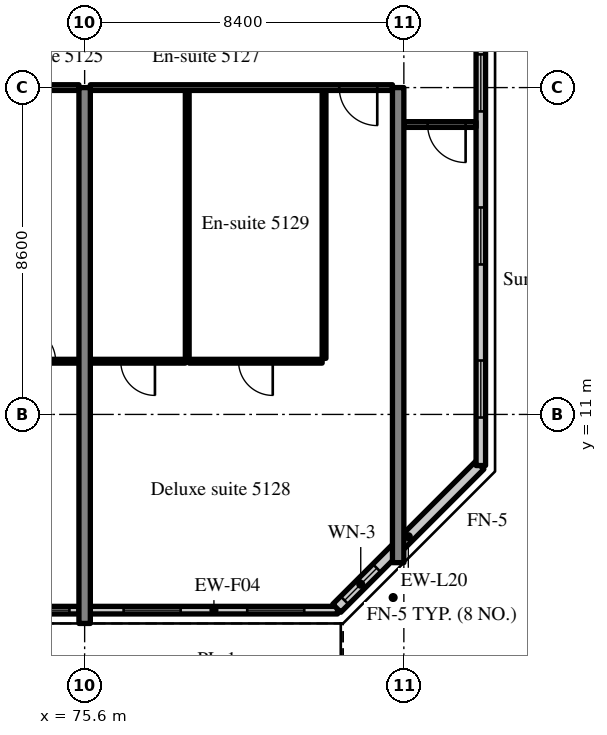
"""IFC4 building model, lengths in metres.
Left out: names, types, materials, properties, quantities, classifications, styles, units other than length and angle.
Written with IfcOpenShell. Run it as: python <this file> out.ifc"""

import sys

from ifc_helpers import new_model, si_unit, direction, frame, frame_2d, origin, place, context, subcontext, project, spatial, rectangle, extrude, source, transform, mapped, element, fill, save


model = new_model("IFC4")
c1 = context("Model", 3, precision=1e-05, world=origin(), true_north=direction((0.0, 1.0)))
c2 = subcontext(c1, "Body", "Model", "MODEL_VIEW")
j1 = project(units=[si_unit("LENGTHUNIT", "METRE"), si_unit("PLANEANGLEUNIT", "RADIAN")], contexts=[c1])
p1 = place(None, origin())
s1 = spatial("IfcSite", under=j1, at=p1, CompositionType="ELEMENT")
p2 = place(p1, origin())
s2 = spatial("IfcBuilding", under=s1, at=p2, CompositionType="ELEMENT")
p3 = place(p2, frame((0.0, 0.0, 214.0)))
s3 = spatial("IfcBuildingStorey", under=s2, at=p3, CompositionType="ELEMENT", Elevation=214.0)
m1 = source(origin(), c2, "Body", "SweptSolid", [
    extrude(rectangle(XDim=14.1, YDim=0.3, at=frame_2d((7.05, 0.0))), origin(), (0.0, 0.0, 1.0), 3.62),
])
p4 = place(p3, frame((75.6, 5.5, 0.0), z_axis=(0.0, 0.0, 1.0), x_axis=(0.0, 1.0, 0.0)))
e1 = element("IfcWall", 1, at=p4, inside=s3, PredefinedType="SHEAR", context=c2, shape_type="MappedRepresentation", body=[
    mapped(m1, transform((0.0, 0.0, 0.0), scale=1.0)),
])
m2 = source(origin(), c2, "Body", "SweptSolid", [
    extrude(rectangle(XDim=12.5, YDim=0.3, at=frame_2d((6.25, 0.0))), origin(), (0.0, 0.0, 1.0), 3.62),
])
p5 = place(p3, frame((83.85, 7.1, 0.0), z_axis=(0.0, 0.0, 1.0), x_axis=(0.0, 1.0, 0.0)))
e2 = element("IfcWall", 2, at=p5, inside=s3, PredefinedType="SHEAR", context=c2, shape_type="MappedRepresentation", body=[
    mapped(m2, transform((0.0, 0.0, 0.0), scale=1.0)),
])
m3 = source(origin(), c2, "Body", "SweptSolid", [
    extrude(rectangle(XDim=8.1, YDim=0.2, at=frame_2d((4.05, 0.0))), origin(), (0.0, 0.0, 1.0), 3.02),
])
p6 = place(p3, frame((67.35, 5.85, 0.0), z_axis=(0.0, 0.0, 1.0), x_axis=(1.0, 0.0, 0.0)))
e3 = element("IfcWall", 3, at=p6, inside=s3, PredefinedType="SOLIDWALL", context=c2, shape_type="MappedRepresentation", body=[
    mapped(m3, transform((0.0, 0.0, 0.0), scale=1.0)),
])
m4 = source(origin(), c2, "Body", "SweptSolid", [
    extrude(rectangle(XDim=1.2, YDim=2.4, at=frame_2d((0.6, 1.2))), frame((0.0, 0.11, 0.0), z_axis=(0.0, -1.0, 0.0), x_axis=(1.0, 0.0, 0.0)), (0.0, 0.0, 1.0), 0.22),
])
p7 = place(p6, frame((0.25, 0.0, 0.0)))
e4 = element("IfcOpeningElement", 4, at=p7, cuts=e3, PredefinedType="OPENING", context=c2, shape_type="MappedRepresentation", body=[
    mapped(m4, transform((0.0, 0.0, 0.0), scale=1.0)),
])
m5 = source(origin(), c2, "Body", "SweptSolid", [
    extrude(rectangle(XDim=1.5, YDim=1.5, at=frame_2d((0.75, 0.75))), frame((0.0, 0.11, 0.0), z_axis=(0.0, -1.0, 0.0), x_axis=(1.0, 0.0, 0.0)), (0.0, 0.0, 1.0), 0.22),
])
p8 = place(p6, frame((2.3, 0.0, 0.9)))
e5 = element("IfcOpeningElement", 5, at=p8, cuts=e3, PredefinedType="OPENING", context=c2, shape_type="MappedRepresentation", body=[
    mapped(m5, transform((0.0, 0.0, 0.0), scale=1.0)),
])
p9 = place(p6, frame((4.3, 0.0, 0.0)))
e6 = element("IfcOpeningElement", 6, at=p9, cuts=e3, PredefinedType="OPENING", context=c2, shape_type="MappedRepresentation", body=[
    mapped(m4, transform((0.0, 0.0, 0.0), scale=1.0)),
])
p10 = place(p6, frame((6.35, 0.0, 0.9)))
e7 = element("IfcOpeningElement", 7, at=p10, cuts=e3, PredefinedType="OPENING", context=c2, shape_type="MappedRepresentation", body=[
    mapped(m5, transform((0.0, 0.0, 0.0), scale=1.0)),
])
m6 = source(origin(), c2, "Body", "SweptSolid", [
    extrude(rectangle(XDim=6.505, YDim=0.2, at=frame_2d((3.252, 0.0))), origin(), (0.0, 0.0, 1.0), 3.02),
])
p11 = place(p3, frame((75.75, 5.85, 0.0), z_axis=(0.0, 0.0, 1.0), x_axis=(1.0, 0.0, 0.0)))
e8 = element("IfcWall", 8, at=p11, inside=s3, PredefinedType="SOLIDWALL", context=c2, shape_type="MappedRepresentation", body=[
    mapped(m6, transform((0.0, 0.0, 0.0), scale=1.0)),
])
p12 = place(p11, frame((0.876, 0.0, 0.9)))
e9 = element("IfcOpeningElement", 9, at=p12, cuts=e8, PredefinedType="OPENING", context=c2, shape_type="MappedRepresentation", body=[
    mapped(m5, transform((0.0, 0.0, 0.0), scale=1.0)),
])
p13 = place(p11, frame((4.129, 0.0, 0.9)))
e10 = element("IfcOpeningElement", 10, at=p13, cuts=e8, PredefinedType="OPENING", context=c2, shape_type="MappedRepresentation", body=[
    mapped(m5, transform((0.0, 0.0, 0.0), scale=1.0)),
])
m7 = source(origin(), c2, "Body", "SweptSolid", [
    extrude(rectangle(XDim=5.326, YDim=0.3, at=frame_2d((2.663, 0.0))), origin(), (0.0, 0.0, 1.0), 3.62),
])
p14 = place(p3, frame((82.234, 5.9, 0.0), z_axis=(0.0, 0.0, 1.0), x_axis=(0.707083859269, 0.707129702361, 0.0)))
e11 = element("IfcWall", 11, at=p14, inside=s3, PredefinedType="SOLIDWALL", context=c2, shape_type="MappedRepresentation", body=[
    mapped(m7, transform((0.0, 0.0, 0.0), scale=1.0)),
])
m8 = source(origin(), c2, "Body", "SweptSolid", [
    extrude(rectangle(XDim=1.2, YDim=1.5, at=frame_2d((0.6, 0.75))), frame((0.0, 0.16, 0.0), z_axis=(0.0, -1.0, 0.0), x_axis=(1.0, 0.0, 0.0)), (0.0, 0.0, 1.0), 0.32),
])
p15 = place(p14, frame((0.292, 0.0, 0.9)))
e12 = element("IfcOpeningElement", 12, at=p15, cuts=e11, PredefinedType="OPENING", context=c2, shape_type="MappedRepresentation", body=[
    mapped(m8, transform((0.0, 0.0, 0.0), scale=1.0)),
])
m9 = source(origin(), c2, "Body", "SweptSolid", [
    extrude(rectangle(XDim=28.189, YDim=0.25, at=frame_2d((14.095, 0.0))), origin(), (0.0, 0.0, 1.0), 3.62),
])
p16 = place(p3, frame((86.025, 9.655, 0.0), z_axis=(0.0, 0.0, 1.0), x_axis=(0.0, 1.0, 0.0)))
e13 = element("IfcWall", 13, at=p16, inside=s3, PredefinedType="SOLIDWALL", context=c2, shape_type="MappedRepresentation", body=[
    mapped(m9, transform((0.0, 0.0, 0.0), scale=1.0)),
])
m10 = source(origin(), c2, "Body", "SweptSolid", [
    extrude(rectangle(XDim=1.5, YDim=1.5, at=frame_2d((0.75, 0.75))), frame((0.0, 0.135, 0.0), z_axis=(0.0, -1.0, 0.0), x_axis=(1.0, 0.0, 0.0)), (0.0, 0.0, 1.0), 0.27),
])
p17 = place(p16, frame((1.263, 0.0, 0.9)))
e14 = element("IfcOpeningElement", 14, at=p17, cuts=e13, PredefinedType="OPENING", context=c2, shape_type="MappedRepresentation", body=[
    mapped(m10, transform((0.0, 0.0, 0.0), scale=1.0)),
])
p18 = place(p16, frame((5.291, 0.0, 0.9)))
e15 = element("IfcOpeningElement", 15, at=p18, cuts=e13, PredefinedType="OPENING", context=c2, shape_type="MappedRepresentation", body=[
    mapped(m10, transform((0.0, 0.0, 0.0), scale=1.0)),
])
p19 = place(p16, frame((9.318, 0.0, 0.9)))
e16 = element("IfcOpeningElement", 16, at=p19, cuts=e13, PredefinedType="OPENING", context=c2, shape_type="MappedRepresentation", body=[
    mapped(m10, transform((0.0, 0.0, 0.0), scale=1.0)),
])
p20 = place(p16, frame((13.345, 0.0, 0.9)))
e17 = element("IfcOpeningElement", 17, at=p20, cuts=e13, PredefinedType="OPENING", context=c2, shape_type="MappedRepresentation", body=[
    mapped(m10, transform((0.0, 0.0, 0.0), scale=1.0)),
])
p21 = place(p16, frame((17.372, 0.0, 0.9)))
e18 = element("IfcOpeningElement", 18, at=p21, cuts=e13, PredefinedType="OPENING", context=c2, shape_type="MappedRepresentation", body=[
    mapped(m10, transform((0.0, 0.0, 0.0), scale=1.0)),
])
p22 = place(p16, frame((21.399, 0.0, 0.9)))
e19 = element("IfcOpeningElement", 19, at=p22, cuts=e13, PredefinedType="OPENING", context=c2, shape_type="MappedRepresentation", body=[
    mapped(m10, transform((0.0, 0.0, 0.0), scale=1.0)),
])
p23 = place(p16, frame((25.426, 0.0, 0.9)))
e20 = element("IfcOpeningElement", 20, at=p23, cuts=e13, PredefinedType="OPENING", context=c2, shape_type="MappedRepresentation", body=[
    mapped(m10, transform((0.0, 0.0, 0.0), scale=1.0)),
])
m11 = source(origin(), c2, "Body", "SweptSolid", [
    extrude(rectangle(XDim=2.125, YDim=0.1, at=frame_2d((1.062, 0.0))), origin(), (0.0, 0.0, 1.0), 3.62),
])
p24 = place(p3, frame((73.325, 12.4, 0.0), z_axis=(0.0, 0.0, 1.0), x_axis=(1.0, 0.0, 0.0)))
e21 = element("IfcWall", 21, at=p24, inside=s3, PredefinedType="PARTITIONING", context=c2, shape_type="MappedRepresentation", body=[
    mapped(m11, transform((0.0, 0.0, 0.0), scale=1.0)),
])
m12 = source(origin(), c2, "Body", "SweptSolid", [
    extrude(rectangle(XDim=0.9, YDim=2.1, at=frame_2d((0.45, 1.05))), frame((0.0, 0.06, 0.0), z_axis=(0.0, -1.0, 0.0), x_axis=(1.0, 0.0, 0.0)), (0.0, 0.0, 1.0), 0.12),
])
p25 = place(p24, frame((0.612, 0.0, 0.0)))
e22 = element("IfcOpeningElement", 22, at=p25, cuts=e21, PredefinedType="OPENING", context=c2, shape_type="MappedRepresentation", body=[
    mapped(m12, transform((0.0, 0.0, 0.0), scale=1.0)),
])
m13 = source(origin(), c2, "Body", "SweptSolid", [
    extrude(rectangle(XDim=3.975, YDim=0.15, at=frame_2d((1.987, 0.0))), origin(), (0.0, 0.0, 1.0), 2.92),
])
p26 = place(p3, frame((71.475, 19.6, 0.0), z_axis=(0.0, 0.0, 1.0), x_axis=(1.0, 0.0, 0.0)))
e23 = element("IfcWall", 23, at=p26, inside=s3, PredefinedType="PARTITIONING", context=c2, shape_type="MappedRepresentation", body=[
    mapped(m13, transform((0.0, 0.0, 0.0), scale=1.0)),
])
m14 = source(origin(), c2, "Body", "SweptSolid", [
    extrude(rectangle(XDim=1.0, YDim=2.1, at=frame_2d((0.5, 1.05))), frame((0.0, 0.085, 0.0), z_axis=(0.0, -1.0, 0.0), x_axis=(1.0, 0.0, 0.0)), (0.0, 0.0, 1.0), 0.17),
])
p27 = place(p26, frame((0.4, 0.0, 0.0)))
e24 = element("IfcOpeningElement", 24, at=p27, cuts=e23, PredefinedType="OPENING", context=c2, shape_type="MappedRepresentation", body=[
    mapped(m14, transform((0.0, 0.0, 0.0), scale=1.0)),
])
m15 = source(origin(), c2, "Body", "SweptSolid", [
    extrude(rectangle(XDim=7.05, YDim=0.1, at=frame_2d((3.525, 0.0))), origin(), (0.0, 0.0, 1.0), 3.62),
])
for number, where, z_axis, x_axis in (
    (25, (81.9, 12.475, 0.0), (0.0, 0.0, 1.0), (0.0, 1.0, 0.0)),
    (26, (78.3, 12.475, 0.0), (0.0, 0.0, 1.0), (0.0, 1.0, 0.0)),
):
    element("IfcWall", number, at=place(p3, frame(where, z_axis=z_axis, x_axis=x_axis)), inside=s3, PredefinedType="PARTITIONING", context=c2, shape_type="MappedRepresentation", body=[
        mapped(m15, transform((0.0, 0.0, 0.0), scale=1.0)),
    ])
m16 = source(origin(), c2, "Body", "SweptSolid", [
    extrude(rectangle(XDim=3.5, YDim=0.1, at=frame_2d((1.75, 0.0))), origin(), (0.0, 0.0, 1.0), 3.62),
])
p28 = place(p3, frame((78.35, 12.4, 0.0), z_axis=(0.0, 0.0, 1.0), x_axis=(1.0, 0.0, 0.0)))
e27 = element("IfcWall", 27, at=p28, inside=s3, PredefinedType="PARTITIONING", context=c2, shape_type="MappedRepresentation", body=[
    mapped(m16, transform((0.0, 0.0, 0.0), scale=1.0)),
])
p29 = place(p28, frame((1.3, 0.0, 0.0)))
e28 = element("IfcOpeningElement", 28, at=p29, cuts=e27, PredefinedType="OPENING", context=c2, shape_type="MappedRepresentation", body=[
    mapped(m12, transform((0.0, 0.0, 0.0), scale=1.0)),
])
m17 = source(origin(), c2, "Body", "SweptSolid", [
    extrude(rectangle(XDim=2.5, YDim=0.1, at=frame_2d((1.25, 0.0))), origin(), (0.0, 0.0, 1.0), 3.62),
])
p30 = place(p3, frame((75.75, 12.4, 0.0), z_axis=(0.0, 0.0, 1.0), x_axis=(1.0, 0.0, 0.0)))
e29 = element("IfcWall", 29, at=p30, inside=s3, PredefinedType="PARTITIONING", context=c2, shape_type="MappedRepresentation", body=[
    mapped(m17, transform((0.0, 0.0, 0.0), scale=1.0)),
])
p31 = place(p30, frame((0.8, 0.0, 0.0)))
e30 = element("IfcOpeningElement", 30, at=p31, cuts=e29, PredefinedType="OPENING", context=c2, shape_type="MappedRepresentation", body=[
    mapped(m12, transform((0.0, 0.0, 0.0), scale=1.0)),
])
m18 = source(origin(), c2, "Body", "SweptSolid", [
    extrude(rectangle(XDim=7.95, YDim=0.15, at=frame_2d((3.975, 0.0))), origin(), (0.0, 0.0, 1.0), 2.92),
])
p32 = place(p3, frame((75.75, 19.6, 0.0), z_axis=(0.0, 0.0, 1.0), x_axis=(1.0, 0.0, 0.0)))
e31 = element("IfcWall", 31, at=p32, inside=s3, PredefinedType="PARTITIONING", context=c2, shape_type="MappedRepresentation", body=[
    mapped(m18, transform((0.0, 0.0, 0.0), scale=1.0)),
])
p33 = place(p32, frame((6.55, 0.0, 0.0)))
e32 = element("IfcOpeningElement", 32, at=p33, cuts=e31, PredefinedType="OPENING", context=c2, shape_type="MappedRepresentation", body=[
    mapped(m14, transform((0.0, 0.0, 0.0), scale=1.0)),
])
m19 = source(origin(), c2, "Body", "SweptSolid", [
    extrude(rectangle(XDim=1.9, YDim=0.15, at=frame_2d((0.95, 0.0))), origin(), (0.0, 0.0, 1.0), 2.92),
])
p34 = place(p3, frame((84.0, 18.628, 0.0), z_axis=(0.0, 0.0, 1.0), x_axis=(1.0, 0.0, 0.0)))
e33 = element("IfcWall", 33, at=p34, inside=s3, PredefinedType="PARTITIONING", context=c2, shape_type="MappedRepresentation", body=[
    mapped(m19, transform((0.0, 0.0, 0.0), scale=1.0)),
])
p35 = place(p34, frame((0.625, 0.0, 0.0)))
e34 = element("IfcOpeningElement", 34, at=p35, cuts=e33, PredefinedType="OPENING", context=c2, shape_type="MappedRepresentation", body=[
    mapped(m14, transform((0.0, 0.0, 0.0), scale=1.0)),
])
m20 = source(origin(), c2, "Body", "SweptSolid", [
    extrude(rectangle(XDim=1.5, YDim=1.5, at=frame_2d((0.75, 0.75))), frame((0.0, 0.03, 0.0), z_axis=(0.0, -1.0, 0.0), x_axis=(1.0, 0.0, 0.0)), (0.0, 0.0, 1.0), 0.06),
])
p36 = place(p10, origin())
e35 = element("IfcWindow", 35, at=p36, inside=s3, PartitioningType="SINGLE_PANEL", PredefinedType="WINDOW", context=c2, shape_type="MappedRepresentation", body=[
    mapped(m20, transform((0.0, 0.0, 0.0), scale=1.0)),
])
fill(e7, e35)
p37 = place(p12, origin())
e36 = element("IfcWindow", 36, at=p37, inside=s3, PartitioningType="SINGLE_PANEL", PredefinedType="WINDOW", context=c2, shape_type="MappedRepresentation", body=[
    mapped(m20, transform((0.0, 0.0, 0.0), scale=1.0)),
])
fill(e9, e36)
p38 = place(p13, origin())
e37 = element("IfcWindow", 37, at=p38, inside=s3, PartitioningType="SINGLE_PANEL", PredefinedType="WINDOW", context=c2, shape_type="MappedRepresentation", body=[
    mapped(m20, transform((0.0, 0.0, 0.0), scale=1.0)),
])
fill(e10, e37)
m21 = source(origin(), c2, "Body", "SweptSolid", [
    extrude(rectangle(XDim=1.2, YDim=1.5, at=frame_2d((0.6, 0.75))), frame((0.0, 0.03, 0.0), z_axis=(0.0, -1.0, 0.0), x_axis=(1.0, 0.0, 0.0)), (0.0, 0.0, 1.0), 0.06),
])
p39 = place(p15, origin())
e38 = element("IfcWindow", 38, at=p39, inside=s3, PartitioningType="SINGLE_PANEL", PredefinedType="WINDOW", context=c2, shape_type="MappedRepresentation", body=[
    mapped(m21, transform((0.0, 0.0, 0.0), scale=1.0)),
])
fill(e12, e38)
p40 = place(p17, origin())
e39 = element("IfcWindow", 39, at=p40, inside=s3, PartitioningType="SINGLE_PANEL", PredefinedType="WINDOW", context=c2, shape_type="MappedRepresentation", body=[
    mapped(m20, transform((0.0, 0.0, 0.0), scale=1.0)),
])
fill(e14, e39)
p41 = place(p18, origin())
e40 = element("IfcWindow", 40, at=p41, inside=s3, PartitioningType="SINGLE_PANEL", PredefinedType="WINDOW", context=c2, shape_type="MappedRepresentation", body=[
    mapped(m20, transform((0.0, 0.0, 0.0), scale=1.0)),
])
fill(e15, e40)
p42 = place(p19, origin())
e41 = element("IfcWindow", 41, at=p42, inside=s3, PartitioningType="SINGLE_PANEL", PredefinedType="WINDOW", context=c2, shape_type="MappedRepresentation", body=[
    mapped(m20, transform((0.0, 0.0, 0.0), scale=1.0)),
])
fill(e16, e41)
m22 = source(origin(), c2, "Body", "SweptSolid", [
    extrude(rectangle(XDim=0.9, YDim=2.1, at=frame_2d((0.45, 1.05))), frame((0.0, 0.025, 0.0), z_axis=(0.0, -1.0, 0.0), x_axis=(1.0, 0.0, 0.0)), (0.0, 0.0, 1.0), 0.05),
])
p43 = place(p25, origin())
e42 = element("IfcDoor", 42, at=p43, inside=s3, OperationType="SINGLE_SWING_LEFT", PredefinedType="DOOR", context=c2, shape_type="MappedRepresentation", body=[
    mapped(m22, transform((0.0, 0.0, 0.0), scale=1.0)),
])
fill(e22, e42)
p44 = place(p29, origin())
e43 = element("IfcDoor", 43, at=p44, inside=s3, OperationType="SINGLE_SWING_RIGHT", PredefinedType="DOOR", context=c2, shape_type="MappedRepresentation", body=[
    mapped(m22, transform((0.0, 0.0, 0.0), scale=1.0)),
])
fill(e28, e43)
p45 = place(p31, origin())
e44 = element("IfcDoor", 44, at=p45, inside=s3, OperationType="SINGLE_SWING_RIGHT", PredefinedType="DOOR", context=c2, shape_type="MappedRepresentation", body=[
    mapped(m22, transform((0.0, 0.0, 0.0), scale=1.0)),
])
fill(e30, e44)
m23 = source(origin(), c2, "Body", "SweptSolid", [
    extrude(rectangle(XDim=1.0, YDim=2.1, at=frame_2d((0.5, 1.05))), frame((0.0, 0.025, 0.0), z_axis=(0.0, -1.0, 0.0), x_axis=(1.0, 0.0, 0.0)), (0.0, 0.0, 1.0), 0.05),
])
p46 = place(p33, origin())
e45 = element("IfcDoor", 45, at=p46, inside=s3, OperationType="SINGLE_SWING_RIGHT", PredefinedType="DOOR", context=c2, shape_type="MappedRepresentation", body=[
    mapped(m23, transform((0.0, 0.0, 0.0), scale=1.0)),
])
fill(e32, e45)
p47 = place(p35, origin())
e46 = element("IfcDoor", 46, at=p47, inside=s3, OperationType="SINGLE_SWING_RIGHT", PredefinedType="DOOR", context=c2, shape_type="MappedRepresentation", body=[
    mapped(m23, transform((0.0, 0.0, 0.0), scale=1.0)),
])
fill(e34, e46)
save(model, sys.argv[1])
